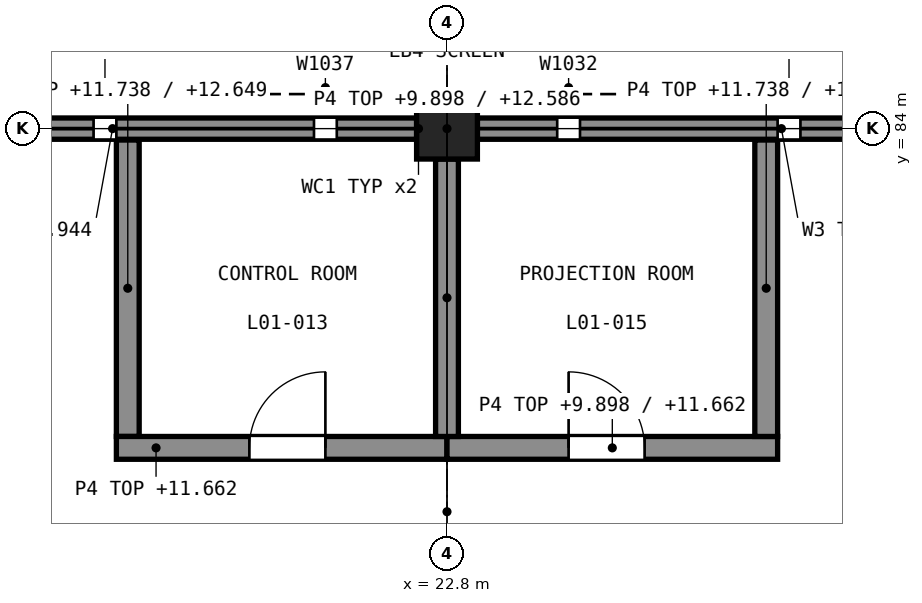
"""IFC4 building model, lengths in metres.
Left out: names, types, materials, properties, quantities, classifications, styles, units other than length and angle.
Written with IfcOpenShell. Run it as: python <this file> out.ifc"""

import sys

from ifc_helpers import new_model, si_unit, direction, frame, frame_2d, origin, origin_2d, place, context, subcontext, project, spatial, polyline, rectangle, outline, extrude, element, fill, save


model = new_model("IFC4")
c1 = context("Model", 3, precision=1e-05, world=origin(), true_north=direction((0.0, 1.0)))
c2 = subcontext(c1, "Body", "Model", "MODEL_VIEW")
j1 = project(units=[si_unit("LENGTHUNIT", "METRE"), si_unit("PLANEANGLEUNIT", "RADIAN")], contexts=[c1])
p1 = place(None, origin())
s1 = spatial("IfcSite", under=j1, at=p1, CompositionType="ELEMENT")
p2 = place(p1, origin())
s2 = spatial("IfcBuilding", under=s1, at=p2, CompositionType="ELEMENT")
p3 = place(p2, frame((0.0, 0.0, 5.5)))
s3 = spatial("IfcBuildingStorey", under=s2, at=p3, CompositionType="ELEMENT", Elevation=5.5)
p4 = place(p3, frame((22.8, 84.0, 0.0), z_axis=(0.0, 0.0, 1.0), x_axis=(1.0, 0.0, 0.0)))
e1 = element("IfcColumn", 1, at=p4, inside=s3, PredefinedType="COLUMN", context=c2, shape_type="SweptSolid", body=[
    extrude(rectangle(XDim=0.8, YDim=0.8, at=origin_2d()), origin(), (0.0, 0.0, 1.0), 5.0),
])
p5 = place(p3, frame((23.2, 84.0, 0.0), z_axis=(0.0, 0.0, 1.0), x_axis=(1.0, 0.0, 0.0)))
e2 = element("IfcWall", 2, at=p5, inside=s3, PredefinedType="SOLIDWALL", context=c2, shape_type="SweptSolid", body=[
    extrude(rectangle(XDim=8.0, YDim=0.28, at=frame_2d((4.0, 0.0))), origin(), (0.0, 0.0, 1.0), 7.444),
])
p6 = place(p5, frame((1.05, 0.0, 1.2)))
e3 = element("IfcOpeningElement", 3, at=p6, cuts=e2, PredefinedType="OPENING", context=c2, shape_type="SweptSolid", body=[
    extrude(rectangle(XDim=0.3, YDim=3.0, at=frame_2d((0.15, 1.5))), frame((0.0, 0.15, 0.0), z_axis=(0.0, -1.0, 0.0), x_axis=(1.0, 0.0, 0.0)), (0.0, 0.0, 1.0), 0.3),
])
p7 = place(p5, frame((3.95, 0.0, 1.2)))
e4 = element("IfcOpeningElement", 4, at=p7, cuts=e2, PredefinedType="OPENING", context=c2, shape_type="SweptSolid", body=[
    extrude(rectangle(XDim=0.3, YDim=3.0, at=frame_2d((0.15, 1.5))), frame((0.0, 0.15, 0.0), z_axis=(0.0, -1.0, 0.0), x_axis=(1.0, 0.0, 0.0)), (0.0, 0.0, 1.0), 0.3),
])
p8 = place(p5, frame((6.65, 0.0, 1.2)))
e5 = element("IfcOpeningElement", 5, at=p8, cuts=e2, PredefinedType="OPENING", context=c2, shape_type="SweptSolid", body=[
    extrude(rectangle(XDim=0.3, YDim=3.0, at=frame_2d((0.15, 1.5))), frame((0.0, 0.15, 0.0), z_axis=(0.0, -1.0, 0.0), x_axis=(1.0, 0.0, 0.0)), (0.0, 0.0, 1.0), 0.3),
])
p9 = place(p5, frame((5.0, 0.0, 0.0)))
e6 = element("IfcOpeningElement", 6, at=p9, cuts=e2, PredefinedType="OPENING", context=c2, shape_type="SweptSolid", body=[
    extrude(rectangle(XDim=1.8, YDim=2.1, at=frame_2d((0.9, 1.05))), frame((0.0, 0.15, 0.0), z_axis=(0.0, -1.0, 0.0), x_axis=(1.0, 0.0, 0.0)), (0.0, 0.0, 1.0), 0.3),
])
p10 = place(p3, frame((14.4, 84.0, 0.0), z_axis=(0.0, 0.0, 1.0), x_axis=(1.0, 0.0, 0.0)))
e7 = element("IfcWall", 7, at=p10, inside=s3, PredefinedType="SOLIDWALL", context=c2, shape_type="SweptSolid", body=[
    extrude(rectangle(XDim=8.0, YDim=0.28, at=frame_2d((4.0, 0.0))), origin(), (0.0, 0.0, 1.0), 7.444),
])
p11 = place(p10, frame((1.05, 0.0, 1.2)))
e8 = element("IfcOpeningElement", 8, at=p11, cuts=e7, PredefinedType="OPENING", context=c2, shape_type="SweptSolid", body=[
    extrude(rectangle(XDim=0.3, YDim=3.0, at=frame_2d((0.15, 1.5))), frame((0.0, 0.15, 0.0), z_axis=(0.0, -1.0, 0.0), x_axis=(1.0, 0.0, 0.0)), (0.0, 0.0, 1.0), 0.3),
])
p12 = place(p10, frame((3.75, 0.0, 1.2)))
e9 = element("IfcOpeningElement", 9, at=p12, cuts=e7, PredefinedType="OPENING", context=c2, shape_type="SweptSolid", body=[
    extrude(rectangle(XDim=0.3, YDim=3.0, at=frame_2d((0.15, 1.5))), frame((0.0, 0.15, 0.0), z_axis=(0.0, -1.0, 0.0), x_axis=(1.0, 0.0, 0.0)), (0.0, 0.0, 1.0), 0.3),
])
p13 = place(p10, frame((6.65, 0.0, 1.2)))
e10 = element("IfcOpeningElement", 10, at=p13, cuts=e7, PredefinedType="OPENING", context=c2, shape_type="SweptSolid", body=[
    extrude(rectangle(XDim=0.3, YDim=3.0, at=frame_2d((0.15, 1.5))), frame((0.0, 0.15, 0.0), z_axis=(0.0, -1.0, 0.0), x_axis=(1.0, 0.0, 0.0)), (0.0, 0.0, 1.0), 0.3),
])
p14 = place(p10, frame((1.2, 0.0, 0.0)))
e11 = element("IfcOpeningElement", 11, at=p14, cuts=e7, PredefinedType="OPENING", context=c2, shape_type="SweptSolid", body=[
    extrude(rectangle(XDim=1.8, YDim=2.1, at=frame_2d((0.9, 1.05))), frame((0.0, 0.15, 0.0), z_axis=(0.0, -1.0, 0.0), x_axis=(1.0, 0.0, 0.0)), (0.0, 0.0, 1.0), 0.3),
])
p15 = place(p3, frame((18.6, 79.95, 0.0), z_axis=(0.0, 0.0, 1.0), x_axis=(0.0, 1.0, 0.0)))
e12 = element("IfcWall", 12, at=p15, inside=s3, PredefinedType="PARTITIONING", context=c2, shape_type="SweptSolid", body=[
    extrude(outline(polyline([(0.0, 0.0), (3.9, 0.0), (3.9, 7.149), (3.15, 6.997), (2.1, 6.732), (1.05, 6.466), (0.0, 6.238), (0.0, 0.0)])), frame((0.0, 0.15, 0.0), z_axis=(0.0, -1.0, 0.0), x_axis=(1.0, 0.0, 0.0)), (0.0, 0.0, 1.0), 0.3),
])
p16 = place(p3, frame((18.45, 79.8, 0.0), z_axis=(0.0, 0.0, 1.0), x_axis=(1.0, 0.0, 0.0)))
e13 = element("IfcWall", 13, at=p16, inside=s3, PredefinedType="PARTITIONING", context=c2, shape_type="SweptSolid", body=[
    extrude(rectangle(XDim=4.35, YDim=0.3, at=frame_2d((2.175, 0.0))), origin(), (0.0, 0.0, 1.0), 6.162),
])
p17 = place(p16, frame((1.75, 0.0, 0.0)))
e14 = element("IfcOpeningElement", 14, at=p17, cuts=e13, PredefinedType="OPENING", context=c2, shape_type="SweptSolid", body=[
    extrude(rectangle(XDim=1.0, YDim=2.1, at=frame_2d((0.5, 1.05))), frame((0.0, 0.16, 0.0), z_axis=(0.0, -1.0, 0.0), x_axis=(1.0, 0.0, 0.0)), (0.0, 0.0, 1.0), 0.32),
])
p18 = place(p3, frame((22.8, 79.8, 0.0), z_axis=(0.0, 0.0, 1.0), x_axis=(1.0, 0.0, 0.0)))
e15 = element("IfcWall", 15, at=p18, inside=s3, PredefinedType="PARTITIONING", context=c2, shape_type="SweptSolid", body=[
    extrude(outline(polyline([(0.0, 0.0), (4.35, 0.0), (4.35, 6.162), (1.05, 6.162), (0.0, 4.398), (0.0, 0.0)])), frame((0.0, 0.15, 0.0), z_axis=(0.0, -1.0, 0.0), x_axis=(1.0, 0.0, 0.0)), (0.0, 0.0, 1.0), 0.3),
])
p19 = place(p18, frame((1.6, 0.0, 0.0)))
e16 = element("IfcOpeningElement", 16, at=p19, cuts=e15, PredefinedType="OPENING", context=c2, shape_type="SweptSolid", body=[
    extrude(rectangle(XDim=1.0, YDim=2.1, at=frame_2d((0.5, 1.05))), frame((0.0, 0.16, 0.0), z_axis=(0.0, -1.0, 0.0), x_axis=(1.0, 0.0, 0.0)), (0.0, 0.0, 1.0), 0.32),
])
p20 = place(p3, frame((22.8, 79.95, 0.0), z_axis=(0.0, 0.0, 1.0), x_axis=(0.0, 1.0, 0.0)))
e17 = element("IfcWall", 17, at=p20, inside=s3, PredefinedType="PARTITIONING", context=c2, shape_type="SweptSolid", body=[
    extrude(outline(polyline([(0.0, 0.0), (3.65, 0.0), (3.65, 7.086), (3.15, 6.997), (2.1, 6.732), (1.05, 4.398), (0.0, 4.398), (0.0, 0.0)])), frame((0.0, 0.15, 0.0), z_axis=(0.0, -1.0, 0.0), x_axis=(1.0, 0.0, 0.0)), (0.0, 0.0, 1.0), 0.3),
])
p21 = place(p3, frame((27.0, 79.95, 0.0), z_axis=(0.0, 0.0, 1.0), x_axis=(0.0, 1.0, 0.0)))
e18 = element("IfcWall", 18, at=p21, inside=s3, PredefinedType="PARTITIONING", context=c2, shape_type="SweptSolid", body=[
    extrude(outline(polyline([(0.0, 0.0), (3.9, 0.0), (3.9, 7.149), (3.15, 6.997), (2.1, 6.732), (1.05, 6.466), (0.0, 6.238), (0.0, 0.0)])), frame((0.0, 0.15, 0.0), z_axis=(0.0, -1.0, 0.0), x_axis=(1.0, 0.0, 0.0)), (0.0, 0.0, 1.0), 0.3),
])
p22 = place(p6, origin())
e19 = element("IfcWindow", 19, at=p22, inside=s3, PartitioningType="SINGLE_PANEL", PredefinedType="WINDOW", context=c2, shape_type="SweptSolid", body=[
    extrude(rectangle(XDim=0.3, YDim=3.0, at=frame_2d((0.15, 1.5))), frame((0.0, -0.06, 0.0), z_axis=(0.0, -1.0, 0.0), x_axis=(1.0, 0.0, 0.0)), (0.0, 0.0, 1.0), 0.06),
])
fill(e3, e19)
p23 = place(p7, origin())
e20 = element("IfcWindow", 20, at=p23, inside=s3, PartitioningType="SINGLE_PANEL", PredefinedType="WINDOW", context=c2, shape_type="SweptSolid", body=[
    extrude(rectangle(XDim=0.3, YDim=3.0, at=frame_2d((0.15, 1.5))), frame((0.0, -0.06, 0.0), z_axis=(0.0, -1.0, 0.0), x_axis=(1.0, 0.0, 0.0)), (0.0, 0.0, 1.0), 0.06),
])
fill(e4, e20)
p24 = place(p12, origin())
e21 = element("IfcWindow", 21, at=p24, inside=s3, PartitioningType="SINGLE_PANEL", PredefinedType="WINDOW", context=c2, shape_type="SweptSolid", body=[
    extrude(rectangle(XDim=0.3, YDim=3.0, at=frame_2d((0.15, 1.5))), frame((0.0, -0.06, 0.0), z_axis=(0.0, -1.0, 0.0), x_axis=(1.0, 0.0, 0.0)), (0.0, 0.0, 1.0), 0.06),
])
fill(e9, e21)
p25 = place(p13, origin())
e22 = element("IfcWindow", 22, at=p25, inside=s3, PartitioningType="SINGLE_PANEL", PredefinedType="WINDOW", context=c2, shape_type="SweptSolid", body=[
    extrude(rectangle(XDim=0.3, YDim=3.0, at=frame_2d((0.15, 1.5))), frame((0.0, -0.06, 0.0), z_axis=(0.0, -1.0, 0.0), x_axis=(1.0, 0.0, 0.0)), (0.0, 0.0, 1.0), 0.06),
])
fill(e10, e22)
p26 = place(p17, origin())
e23 = element("IfcDoor", 23, at=p26, inside=s3, OperationType="SINGLE_SWING_LEFT", PredefinedType="DOOR", context=c2, shape_type="SweptSolid", body=[
    extrude(rectangle(XDim=1.0, YDim=2.1, at=frame_2d((0.5, 1.05))), frame((0.0, 0.025, 0.0), z_axis=(0.0, -1.0, 0.0), x_axis=(1.0, 0.0, 0.0)), (0.0, 0.0, 1.0), 0.05),
])
fill(e14, e23)
p27 = place(p19, origin())
e24 = element("IfcDoor", 24, at=p27, inside=s3, OperationType="SINGLE_SWING_RIGHT", PredefinedType="DOOR", context=c2, shape_type="SweptSolid", body=[
    extrude(rectangle(XDim=1.0, YDim=2.1, at=frame_2d((0.5, 1.05))), frame((0.0, 0.025, 0.0), z_axis=(0.0, -1.0, 0.0), x_axis=(1.0, 0.0, 0.0)), (0.0, 0.0, 1.0), 0.05),
])
fill(e16, e24)
save(model, sys.argv[1])
